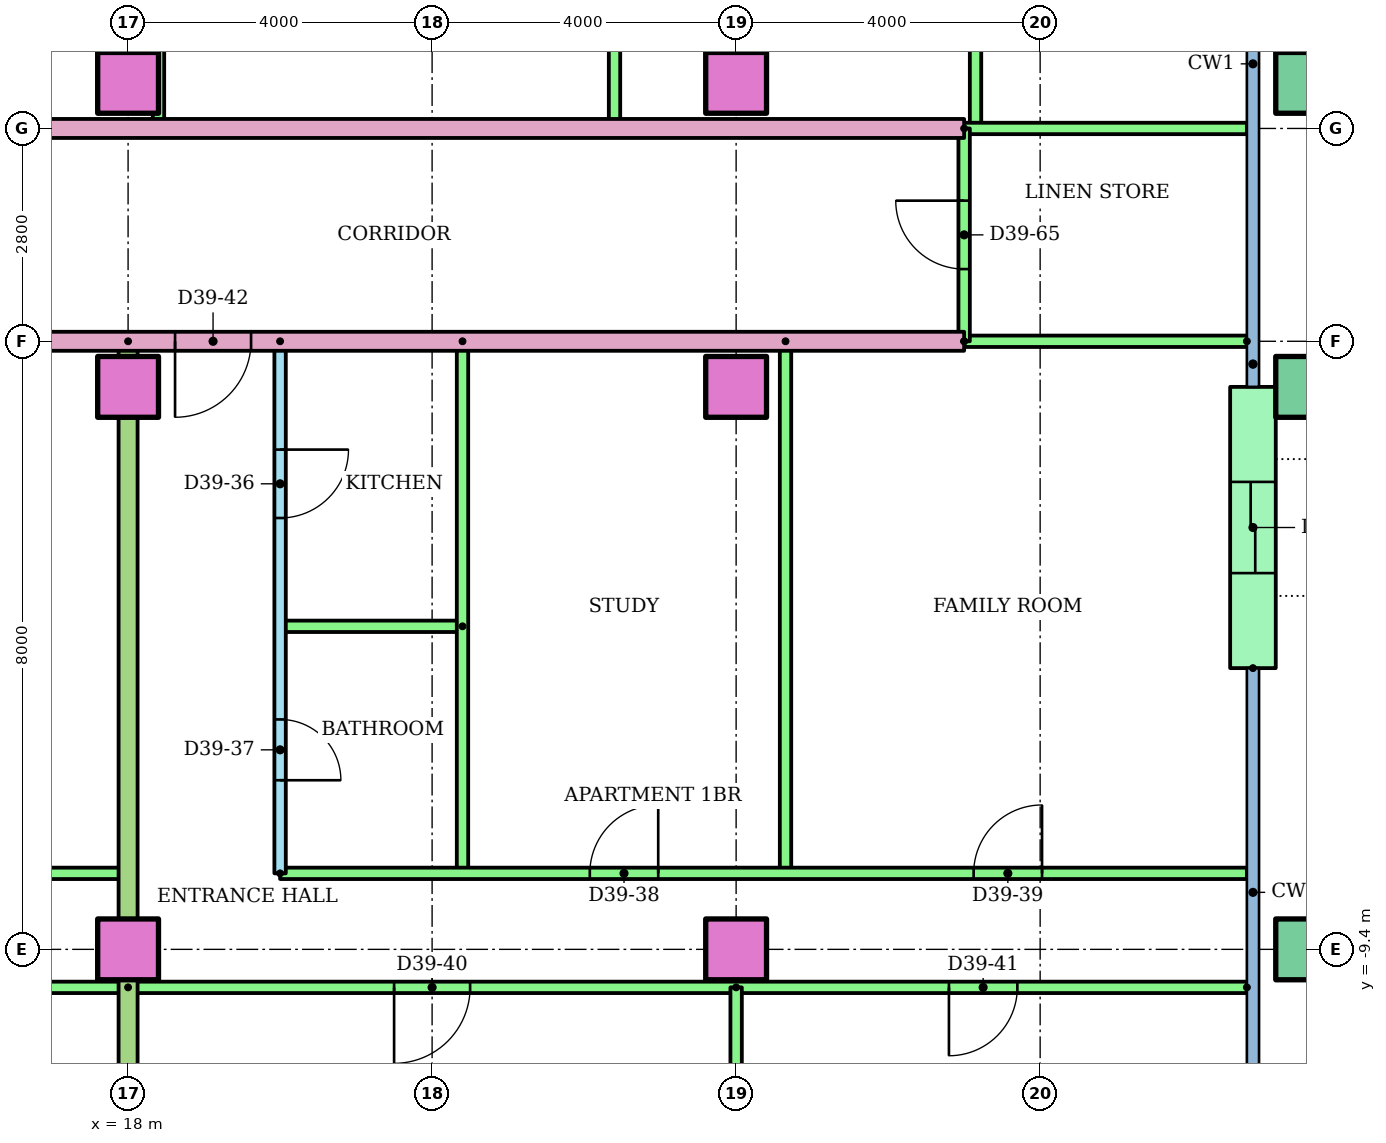
"""IFC4 building model, lengths in metres.
Left out: names, types, materials, properties, quantities, classifications, styles, units other than length and angle.
Written with IfcOpenShell. Run it as: python <this file> out.ifc"""

import sys

from ifc_helpers import new_model, si_unit, direction, frame, frame_2d, origin, origin_2d, place, context, subcontext, project, spatial, rectangle, hollow_rectangle, extrude, element, fill, save


model = new_model("IFC4")
c1 = context("Model", 3, precision=1e-05, world=origin(), true_north=direction((0.0, 1.0)))
c2 = subcontext(c1, "Body", "Model", "MODEL_VIEW")
j1 = project(units=[si_unit("LENGTHUNIT", "METRE"), si_unit("PLANEANGLEUNIT", "RADIAN")], contexts=[c1])
p1 = place(None, origin())
s1 = spatial("IfcSite", under=j1, at=p1, CompositionType="ELEMENT")
p2 = place(p1, origin())
s2 = spatial("IfcBuilding", under=s1, at=p2, CompositionType="ELEMENT")
p3 = place(p2, frame((0.0, 0.0, 148.6)))
s3 = spatial("IfcBuildingStorey", under=s2, at=p3, CompositionType="ELEMENT", Elevation=148.6)
for number, where in (
    (1, (18.0, -9.4, 0.0)),
    (2, (26.0, -9.4, 0.0)),
):
    element("IfcColumn", number, at=place(p3, frame(where)), inside=s3, PredefinedType="COLUMN", context=c2, shape_type="SweptSolid", body=[
        extrude(rectangle(XDim=0.8, YDim=0.8, at=origin_2d()), origin(), (0.0, 0.0, 1.0), 3.2),
    ])
p4 = place(p3, frame((33.5, -9.4, 0.0)))
e3 = element("IfcColumn", 3, at=p4, inside=s3, PredefinedType="COLUMN", context=c2, shape_type="SweptSolid", body=[
    extrude(hollow_rectangle(XDim=0.8, YDim=0.8, WallThickness=0.04, at=origin_2d()), origin(), (0.0, 0.0, 1.0), 3.2),
])
for number, where in (
    (4, (18.0, -2.0, 0.0)),
    (5, (26.0, -2.0, 0.0)),
):
    element("IfcColumn", number, at=place(p3, frame(where)), inside=s3, PredefinedType="COLUMN", context=c2, shape_type="SweptSolid", body=[
        extrude(rectangle(XDim=0.8, YDim=0.8, at=origin_2d()), origin(), (0.0, 0.0, 1.0), 3.2),
    ])
p5 = place(p3, frame((33.5, -2.0, 0.0)))
e6 = element("IfcColumn", 6, at=p5, inside=s3, PredefinedType="COLUMN", context=c2, shape_type="SweptSolid", body=[
    extrude(hollow_rectangle(XDim=0.8, YDim=0.8, WallThickness=0.04, at=origin_2d()), origin(), (0.0, 0.0, 1.0), 3.2),
])
for number, where in (
    (7, (18.0, 2.0, 0.0)),
    (8, (26.0, 2.0, 0.0)),
):
    element("IfcColumn", number, at=place(p3, frame(where)), inside=s3, PredefinedType="COLUMN", context=c2, shape_type="SweptSolid", body=[
        extrude(rectangle(XDim=0.8, YDim=0.8, at=origin_2d()), origin(), (0.0, 0.0, 1.0), 3.2),
    ])
p6 = place(p3, frame((33.5, 2.0, 0.0)))
e9 = element("IfcColumn", 9, at=p6, inside=s3, PredefinedType="COLUMN", context=c2, shape_type="SweptSolid", body=[
    extrude(hollow_rectangle(XDim=0.8, YDim=0.8, WallThickness=0.04, at=origin_2d()), origin(), (0.0, 0.0, 1.0), 3.2),
])
p7 = place(p3, frame((32.8, -5.7, 0.0), z_axis=(0.0, 0.0, 1.0), x_axis=(0.0, 1.0, 0.0)))
e10 = element("IfcWall", 10, at=p7, inside=s3, PredefinedType="STANDARD", context=c2, shape_type="SweptSolid", body=[
    extrude(rectangle(XDim=3.7, YDim=0.6, at=frame_2d((1.85, 0.0))), origin(), (0.0, 0.0, 1.0), 2.8),
])
p8 = place(p7, frame((1.25, 0.0, 0.0)))
e11 = element("IfcOpeningElement", 11, at=p8, cuts=e10, PredefinedType="OPENING", context=c2, shape_type="SweptSolid", body=[
    extrude(rectangle(XDim=1.2, YDim=2.1, at=frame_2d((0.6, 1.05))), frame((0.0, 0.31, 0.0), z_axis=(0.0, -1.0, 0.0), x_axis=(1.0, 0.0, 0.0)), (0.0, 0.0, 1.0), 0.62),
])
p9 = place(p3, frame((-4.0, -8.4, 0.0)))
e12 = element("IfcWall", 12, at=p9, inside=s3, PredefinedType="PARTITIONING", context=c2, shape_type="SweptSolid", body=[
    extrude(rectangle(XDim=22.0, YDim=0.15, at=frame_2d((11.0, 0.0))), origin(), (0.0, 0.0, 1.0), 2.4),
])
p10 = place(p9, frame((6.618, 0.0, 0.0)))
e13 = element("IfcOpeningElement", 13, at=p10, cuts=e12, PredefinedType="OPENING", context=c2, shape_type="SweptSolid", body=[
    extrude(rectangle(XDim=0.9, YDim=2.1, at=frame_2d((0.45, 1.05))), frame((0.0, 0.085, 0.0), z_axis=(0.0, -1.0, 0.0), x_axis=(1.0, 0.0, 0.0)), (0.0, 0.0, 1.0), 0.17),
])
p11 = place(p9, frame((12.482, 0.0, 0.0)))
e14 = element("IfcOpeningElement", 14, at=p11, cuts=e12, PredefinedType="OPENING", context=c2, shape_type="SweptSolid", body=[
    extrude(rectangle(XDim=0.9, YDim=2.1, at=frame_2d((0.45, 1.05))), frame((0.0, 0.085, 0.0), z_axis=(0.0, -1.0, 0.0), x_axis=(1.0, 0.0, 0.0)), (0.0, 0.0, 1.0), 0.17),
])
p12 = place(p9, frame((19.125, 0.0, 0.0)))
e15 = element("IfcOpeningElement", 15, at=p12, cuts=e12, PredefinedType="OPENING", context=c2, shape_type="SweptSolid", body=[
    extrude(rectangle(XDim=0.9, YDim=2.1, at=frame_2d((0.45, 1.05))), frame((0.0, 0.085, 0.0), z_axis=(0.0, -1.0, 0.0), x_axis=(1.0, 0.0, 0.0)), (0.0, 0.0, 1.0), 0.17),
])
p13 = place(p3, frame((18.0, -9.9, 0.0), z_axis=(0.0, 0.0, 1.0), x_axis=(-1.0, 0.0, 0.0)))
e16 = element("IfcWall", 16, at=p13, inside=s3, PredefinedType="PARTITIONING", context=c2, shape_type="SweptSolid", body=[
    extrude(rectangle(XDim=24.0, YDim=0.15, at=frame_2d((12.0, 0.0))), origin(), (0.0, 0.0, 1.0), 2.4),
])
p14 = place(p13, frame((21.55, 0.0, 0.0)))
e17 = element("IfcOpeningElement", 17, at=p14, cuts=e16, PredefinedType="OPENING", context=c2, shape_type="SweptSolid", body=[
    extrude(rectangle(XDim=0.9, YDim=2.1, at=frame_2d((0.45, 1.05))), frame((0.0, 0.085, 0.0), z_axis=(0.0, -1.0, 0.0), x_axis=(1.0, 0.0, 0.0)), (0.0, 0.0, 1.0), 0.17),
])
p15 = place(p13, frame((17.55, 0.0, 0.0)))
e18 = element("IfcOpeningElement", 18, at=p15, cuts=e16, PredefinedType="OPENING", context=c2, shape_type="SweptSolid", body=[
    extrude(rectangle(XDim=0.9, YDim=2.1, at=frame_2d((0.45, 1.05))), frame((0.0, 0.085, 0.0), z_axis=(0.0, -1.0, 0.0), x_axis=(1.0, 0.0, 0.0)), (0.0, 0.0, 1.0), 0.17),
])
p16 = place(p13, frame((11.5, 0.0, 0.0)))
e19 = element("IfcOpeningElement", 19, at=p16, cuts=e16, PredefinedType="OPENING", context=c2, shape_type="SweptSolid", body=[
    extrude(rectangle(XDim=1.0, YDim=2.1, at=frame_2d((0.5, 1.05))), frame((0.0, 0.085, 0.0), z_axis=(0.0, -1.0, 0.0), x_axis=(1.0, 0.0, 0.0)), (0.0, 0.0, 1.0), 0.17),
])
p17 = place(p13, frame((5.55, 0.0, 0.0)))
e20 = element("IfcOpeningElement", 20, at=p17, cuts=e16, PredefinedType="OPENING", context=c2, shape_type="SweptSolid", body=[
    extrude(rectangle(XDim=0.9, YDim=2.1, at=frame_2d((0.45, 1.05))), frame((0.0, 0.085, 0.0), z_axis=(0.0, -1.0, 0.0), x_axis=(1.0, 0.0, 0.0)), (0.0, 0.0, 1.0), 0.17),
])
p18 = place(p13, frame((1.55, 0.0, 0.0)))
e21 = element("IfcOpeningElement", 21, at=p18, cuts=e16, PredefinedType="OPENING", context=c2, shape_type="SweptSolid", body=[
    extrude(rectangle(XDim=0.9, YDim=2.1, at=frame_2d((0.45, 1.05))), frame((0.0, 0.085, 0.0), z_axis=(0.0, -1.0, 0.0), x_axis=(1.0, 0.0, 0.0)), (0.0, 0.0, 1.0), 0.17),
])
p19 = place(p3, frame((20.0, -1.4, 0.0), z_axis=(0.0, 0.0, 1.0), x_axis=(0.0, -1.0, 0.0)))
e22 = element("IfcWall", 22, at=p19, inside=s3, PredefinedType="PARTITIONING", context=c2, shape_type="SweptSolid", body=[
    extrude(rectangle(XDim=7.0, YDim=0.15, at=frame_2d((3.5, 0.0))), origin(), (0.0, 0.0, 1.0), 2.4),
])
p20 = place(p19, frame((1.425, 0.0, 0.0)))
e23 = element("IfcOpeningElement", 23, at=p20, cuts=e22, PredefinedType="OPENING", context=c2, shape_type="SweptSolid", body=[
    extrude(rectangle(XDim=0.9, YDim=2.1, at=frame_2d((0.45, 1.05))), frame((0.0, 0.085, 0.0), z_axis=(0.0, -1.0, 0.0), x_axis=(1.0, 0.0, 0.0)), (0.0, 0.0, 1.0), 0.17),
])
p21 = place(p19, frame((4.975, 0.0, 0.0)))
e24 = element("IfcOpeningElement", 24, at=p21, cuts=e22, PredefinedType="OPENING", context=c2, shape_type="SweptSolid", body=[
    extrude(rectangle(XDim=0.8, YDim=2.1, at=frame_2d((0.4, 1.05))), frame((0.0, 0.085, 0.0), z_axis=(0.0, -1.0, 0.0), x_axis=(1.0, 0.0, 0.0)), (0.0, 0.0, 1.0), 0.17),
])
p22 = place(p3, frame((22.4, -5.15, 0.0), z_axis=(0.0, 0.0, 1.0), x_axis=(-1.0, 0.0, 0.0)))
e25 = element("IfcWall", 25, at=p22, inside=s3, PredefinedType="PARTITIONING", context=c2, shape_type="SweptSolid", body=[
    extrude(rectangle(XDim=2.4, YDim=0.15, at=frame_2d((1.2, 0.0))), origin(), (0.0, 0.0, 1.0), 2.4),
])
for number, where, z_axis, x_axis in (
    (26, (22.4, -1.4, 0.0), (0.0, 0.0, 1.0), (0.0, -1.0, 0.0)),
    (27, (26.65, -1.4, 0.0), (0.0, 0.0, 1.0), (0.0, -1.0, 0.0)),
):
    element("IfcWall", number, at=place(p3, frame(where, z_axis=z_axis, x_axis=x_axis)), inside=s3, PredefinedType="PARTITIONING", context=c2, shape_type="SweptSolid", body=[
        extrude(rectangle(XDim=7.0, YDim=0.15, at=frame_2d((3.5, 0.0))), origin(), (0.0, 0.0, 1.0), 2.4),
    ])
p23 = place(p3, frame((20.0, -8.4, 0.0)))
e28 = element("IfcWall", 28, at=p23, inside=s3, PredefinedType="PARTITIONING", context=c2, shape_type="SweptSolid", body=[
    extrude(rectangle(XDim=12.72, YDim=0.15, at=frame_2d((6.36, 0.0))), origin(), (0.0, 0.0, 1.0), 2.4),
])
p24 = place(p23, frame((4.075, 0.0, 0.0)))
e29 = element("IfcOpeningElement", 29, at=p24, cuts=e28, PredefinedType="OPENING", context=c2, shape_type="SweptSolid", body=[
    extrude(rectangle(XDim=0.9, YDim=2.1, at=frame_2d((0.45, 1.05))), frame((0.0, 0.085, 0.0), z_axis=(0.0, -1.0, 0.0), x_axis=(1.0, 0.0, 0.0)), (0.0, 0.0, 1.0), 0.17),
])
p25 = place(p23, frame((9.125, 0.0, 0.0)))
e30 = element("IfcOpeningElement", 30, at=p25, cuts=e28, PredefinedType="OPENING", context=c2, shape_type="SweptSolid", body=[
    extrude(rectangle(XDim=0.9, YDim=2.1, at=frame_2d((0.45, 1.05))), frame((0.0, 0.085, 0.0), z_axis=(0.0, -1.0, 0.0), x_axis=(1.0, 0.0, 0.0)), (0.0, 0.0, 1.0), 0.17),
])
p26 = place(p3, frame((32.72, -9.9, 0.0), z_axis=(0.0, 0.0, 1.0), x_axis=(-1.0, 0.0, 0.0)))
e31 = element("IfcWall", 31, at=p26, inside=s3, PredefinedType="PARTITIONING", context=c2, shape_type="SweptSolid", body=[
    extrude(rectangle(XDim=14.72, YDim=0.15, at=frame_2d((7.36, 0.0))), origin(), (0.0, 0.0, 1.0), 2.4),
])
p27 = place(p26, frame((10.22, 0.0, 0.0)))
e32 = element("IfcOpeningElement", 32, at=p27, cuts=e31, PredefinedType="OPENING", context=c2, shape_type="SweptSolid", body=[
    extrude(rectangle(XDim=1.0, YDim=2.1, at=frame_2d((0.5, 1.05))), frame((0.0, 0.085, 0.0), z_axis=(0.0, -1.0, 0.0), x_axis=(1.0, 0.0, 0.0)), (0.0, 0.0, 1.0), 0.17),
])
p28 = place(p26, frame((3.02, 0.0, 0.0)))
e33 = element("IfcOpeningElement", 33, at=p28, cuts=e31, PredefinedType="OPENING", context=c2, shape_type="SweptSolid", body=[
    extrude(rectangle(XDim=0.9, YDim=2.1, at=frame_2d((0.45, 1.05))), frame((0.0, 0.085, 0.0), z_axis=(0.0, -1.0, 0.0), x_axis=(1.0, 0.0, 0.0)), (0.0, 0.0, 1.0), 0.17),
])
p29 = place(p3, frame((26.0, -9.9, 0.0), z_axis=(0.0, 0.0, 1.0), x_axis=(0.0, -1.0, 0.0)))
e34 = element("IfcWall", 34, at=p29, inside=s3, PredefinedType="PARTITIONING", context=c2, shape_type="SweptSolid", body=[
    extrude(rectangle(XDim=6.41, YDim=0.15, at=frame_2d((3.205, 0.0))), origin(), (0.0, 0.0, 1.0), 2.4),
])
p30 = place(p3, frame((18.0, -1.4, 0.0), z_axis=(0.0, 0.0, 1.0), x_axis=(0.0, -1.0, 0.0)))
e35 = element("IfcWall", 35, at=p30, inside=s3, PredefinedType="PARTITIONING", context=c2, shape_type="SweptSolid", body=[
    extrude(rectangle(XDim=14.91, YDim=0.25, at=frame_2d((7.455, 0.0))), origin(), (0.0, 0.0, 1.0), 2.4),
])
p31 = place(p3, frame((29.0, -1.4, 0.0), z_axis=(0.0, 0.0, 1.0), x_axis=(-1.0, 0.0, 0.0)))
e36 = element("IfcWall", 36, at=p31, inside=s3, PredefinedType="PARTITIONING", context=c2, shape_type="SweptSolid", body=[
    extrude(rectangle(XDim=15.0, YDim=0.25, at=frame_2d((7.5, 0.0))), origin(), (0.0, 0.0, 1.0), 2.4),
])
p32 = place(p31, frame((9.382, 0.0, 0.0)))
e37 = element("IfcOpeningElement", 37, at=p32, cuts=e36, PredefinedType="OPENING", context=c2, shape_type="SweptSolid", body=[
    extrude(rectangle(XDim=1.0, YDim=2.1, at=frame_2d((0.5, 1.05))), frame((0.0, 0.135, 0.0), z_axis=(0.0, -1.0, 0.0), x_axis=(1.0, 0.0, 0.0)), (0.0, 0.0, 1.0), 0.27),
])
p33 = place(p3, frame((32.72, -1.4, 0.0), z_axis=(0.0, 0.0, 1.0), x_axis=(-1.0, 0.0, 0.0)))
e38 = element("IfcWall", 38, at=p33, inside=s3, PredefinedType="PARTITIONING", context=c2, shape_type="SweptSolid", body=[
    extrude(rectangle(XDim=3.72, YDim=0.15, at=frame_2d((1.86, 0.0))), origin(), (0.0, 0.0, 1.0), 2.4),
])
for number, where, z_axis, x_axis in (
    (39, (18.4, 10.8, 0.0), (0.0, 0.0, 1.0), (0.0, -1.0, 0.0)),
    (40, (24.4, 10.8, 0.0), (0.0, 0.0, 1.0), (0.0, -1.0, 0.0)),
    (41, (29.15, 10.8, 0.0), (0.0, 0.0, 1.0), (0.0, -1.0, 0.0)),
):
    element("IfcWall", number, at=place(p3, frame(where, z_axis=z_axis, x_axis=x_axis)), inside=s3, PredefinedType="PARTITIONING", context=c2, shape_type="SweptSolid", body=[
        extrude(rectangle(XDim=9.4, YDim=0.15, at=frame_2d((4.7, 0.0))), origin(), (0.0, 0.0, 1.0), 2.4),
    ])
p34 = place(p3, frame((14.0, 1.4, 0.0)))
e42 = element("IfcWall", 42, at=p34, inside=s3, PredefinedType="PARTITIONING", context=c2, shape_type="SweptSolid", body=[
    extrude(rectangle(XDim=15.0, YDim=0.25, at=frame_2d((7.5, 0.0))), origin(), (0.0, 0.0, 1.0), 2.4),
])
p35 = place(p34, frame((0.5, 0.0, 0.0)))
e43 = element("IfcOpeningElement", 43, at=p35, cuts=e42, PredefinedType="OPENING", context=c2, shape_type="SweptSolid", body=[
    extrude(rectangle(XDim=1.0, YDim=2.1, at=frame_2d((0.5, 1.05))), frame((0.0, 0.135, 0.0), z_axis=(0.0, -1.0, 0.0), x_axis=(1.0, 0.0, 0.0)), (0.0, 0.0, 1.0), 0.27),
])
p36 = place(p3, frame((29.0, 1.4, 0.0)))
e44 = element("IfcWall", 44, at=p36, inside=s3, PredefinedType="PARTITIONING", context=c2, shape_type="SweptSolid", body=[
    extrude(rectangle(XDim=3.72, YDim=0.15, at=frame_2d((1.86, 0.0))), origin(), (0.0, 0.0, 1.0), 2.4),
])
p37 = place(p3, frame((29.0, -1.4, 0.0), z_axis=(0.0, 0.0, 1.0), x_axis=(0.0, 1.0, 0.0)))
e45 = element("IfcWall", 45, at=p37, inside=s3, PredefinedType="PARTITIONING", context=c2, shape_type="SweptSolid", body=[
    extrude(rectangle(XDim=2.8, YDim=0.15, at=frame_2d((1.4, 0.0))), origin(), (0.0, 0.0, 1.0), 2.4),
])
p38 = place(p37, frame((0.95, 0.0, 0.0)))
e46 = element("IfcOpeningElement", 46, at=p38, cuts=e45, PredefinedType="OPENING", context=c2, shape_type="SweptSolid", body=[
    extrude(rectangle(XDim=0.9, YDim=2.1, at=frame_2d((0.45, 1.05))), frame((0.0, 0.085, 0.0), z_axis=(0.0, -1.0, 0.0), x_axis=(1.0, 0.0, 0.0)), (0.0, 0.0, 1.0), 0.17),
])
p39 = place(p20, origin())
e47 = element("IfcDoor", 47, at=p39, inside=s3, OperationType="SINGLE_SWING_LEFT", PredefinedType="DOOR", context=c2, shape_type="SweptSolid", body=[
    extrude(rectangle(XDim=0.9, YDim=2.1, at=frame_2d((0.45, 1.05))), frame((0.0, 0.025, 0.0), z_axis=(0.0, -1.0, 0.0), x_axis=(1.0, 0.0, 0.0)), (0.0, 0.0, 1.0), 0.05),
])
fill(e23, e47)
p40 = place(p21, origin())
e48 = element("IfcDoor", 48, at=p40, inside=s3, OperationType="SINGLE_SWING_RIGHT", PredefinedType="DOOR", context=c2, shape_type="SweptSolid", body=[
    extrude(rectangle(XDim=0.8, YDim=2.1, at=frame_2d((0.4, 1.05))), frame((0.0, 0.025, 0.0), z_axis=(0.0, -1.0, 0.0), x_axis=(1.0, 0.0, 0.0)), (0.0, 0.0, 1.0), 0.05),
])
fill(e24, e48)
p41 = place(p24, origin())
e49 = element("IfcDoor", 49, at=p41, inside=s3, OperationType="SINGLE_SWING_RIGHT", PredefinedType="DOOR", context=c2, shape_type="SweptSolid", body=[
    extrude(rectangle(XDim=0.9, YDim=2.1, at=frame_2d((0.45, 1.05))), frame((0.0, 0.025, 0.0), z_axis=(0.0, -1.0, 0.0), x_axis=(1.0, 0.0, 0.0)), (0.0, 0.0, 1.0), 0.05),
])
fill(e29, e49)
p42 = place(p25, origin())
e50 = element("IfcDoor", 50, at=p42, inside=s3, OperationType="SINGLE_SWING_RIGHT", PredefinedType="DOOR", context=c2, shape_type="SweptSolid", body=[
    extrude(rectangle(XDim=0.9, YDim=2.1, at=frame_2d((0.45, 1.05))), frame((0.0, 0.025, 0.0), z_axis=(0.0, -1.0, 0.0), x_axis=(1.0, 0.0, 0.0)), (0.0, 0.0, 1.0), 0.05),
])
fill(e30, e50)
p43 = place(p27, origin())
e51 = element("IfcDoor", 51, at=p43, inside=s3, OperationType="SINGLE_SWING_RIGHT", PredefinedType="DOOR", context=c2, shape_type="SweptSolid", body=[
    extrude(rectangle(XDim=1.0, YDim=2.1, at=frame_2d((0.5, 1.05))), frame((0.0, 0.025, 0.0), z_axis=(0.0, -1.0, 0.0), x_axis=(1.0, 0.0, 0.0)), (0.0, 0.0, 1.0), 0.05),
])
fill(e32, e51)
p44 = place(p28, origin())
e52 = element("IfcDoor", 52, at=p44, inside=s3, OperationType="SINGLE_SWING_RIGHT", PredefinedType="DOOR", context=c2, shape_type="SweptSolid", body=[
    extrude(rectangle(XDim=0.9, YDim=2.1, at=frame_2d((0.45, 1.05))), frame((0.0, 0.025, 0.0), z_axis=(0.0, -1.0, 0.0), x_axis=(1.0, 0.0, 0.0)), (0.0, 0.0, 1.0), 0.05),
])
fill(e33, e52)
p45 = place(p32, origin())
e53 = element("IfcDoor", 53, at=p45, inside=s3, OperationType="SINGLE_SWING_RIGHT", PredefinedType="DOOR", context=c2, shape_type="SweptSolid", body=[
    extrude(rectangle(XDim=1.0, YDim=2.1, at=frame_2d((0.5, 1.05))), frame((0.0, 0.025, 0.0), z_axis=(0.0, -1.0, 0.0), x_axis=(1.0, 0.0, 0.0)), (0.0, 0.0, 1.0), 0.05),
])
fill(e37, e53)
p46 = place(p38, origin())
e54 = element("IfcDoor", 54, at=p46, inside=s3, OperationType="SINGLE_SWING_RIGHT", PredefinedType="DOOR", context=c2, shape_type="SweptSolid", body=[
    extrude(rectangle(XDim=0.9, YDim=2.1, at=frame_2d((0.45, 1.05))), frame((0.0, 0.025, 0.0), z_axis=(0.0, -1.0, 0.0), x_axis=(1.0, 0.0, 0.0)), (0.0, 0.0, 1.0), 0.05),
])
fill(e46, e54)
p47 = place(p8, origin())
e55 = element("IfcDoor", 55, at=p47, inside=s3, OperationType="SLIDING_TO_LEFT", PredefinedType="DOOR", context=c2, shape_type="SweptSolid", body=[
    extrude(rectangle(XDim=1.2, YDim=2.1, at=frame_2d((0.6, 1.05))), frame((0.0, 0.025, 0.0), z_axis=(0.0, -1.0, 0.0), x_axis=(1.0, 0.0, 0.0)), (0.0, 0.0, 1.0), 0.05),
])
fill(e11, e55)
save(model, sys.argv[1])
